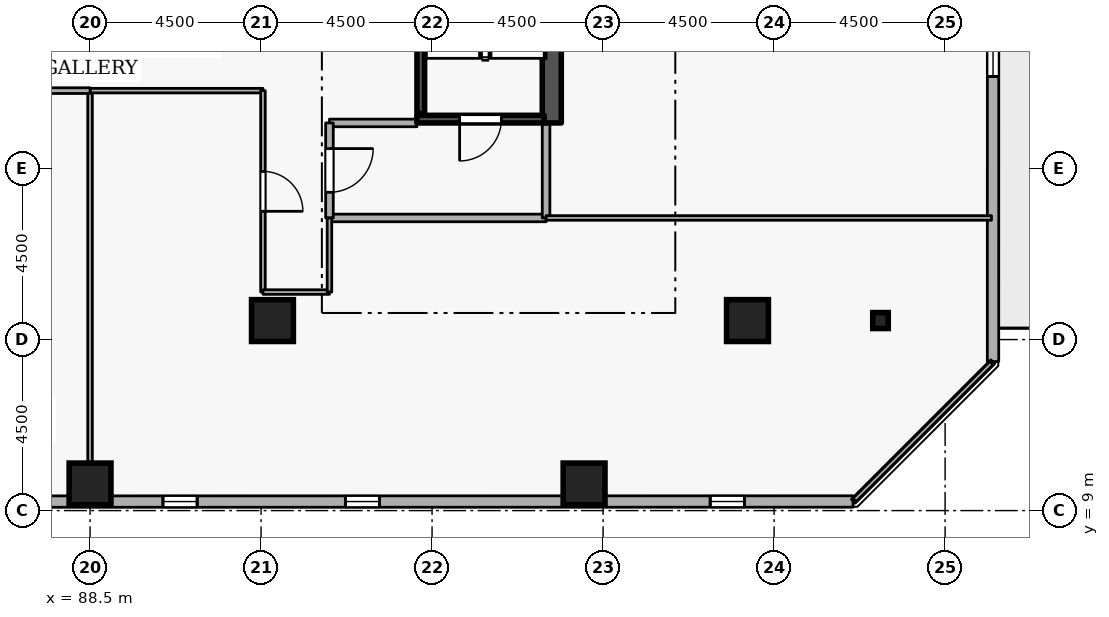
"""IFC4 building model, lengths in metres.
Left out: names, types, materials, properties, quantities, classifications, styles, units other than length and angle.
Written with IfcOpenShell. Run it as: python <this file> out.ifc"""

import sys

from ifc_helpers import new_model, si_unit, direction, frame, frame_2d, origin, origin_2d, place, context, subcontext, project, spatial, rectangle, i_section, extrude, element, fill, save


model = new_model("IFC4")
c1 = context("Model", 3, precision=1e-05, world=origin(), true_north=direction((0.0, 1.0)))
c2 = subcontext(c1, "Body", "Model", "MODEL_VIEW")
j1 = project(units=[si_unit("LENGTHUNIT", "METRE"), si_unit("PLANEANGLEUNIT", "RADIAN")], contexts=[c1])
p1 = place(None, origin())
s1 = spatial("IfcSite", under=j1, at=p1, CompositionType="ELEMENT")
p2 = place(p1, origin())
s2 = spatial("IfcBuilding", under=s1, at=p2, CompositionType="ELEMENT")
p3 = place(p2, frame((0.0, 0.0, 156.3)))
s3 = spatial("IfcBuildingStorey", under=s2, at=p3, CompositionType="ELEMENT", Elevation=156.3)
p4 = place(p3, frame((100.65, 19.2, 0.0), z_axis=(0.0, 0.0, 1.0), x_axis=(0.0, 1.0, 0.0)))
e1 = element("IfcWall", 1, at=p4, inside=s3, PredefinedType="SHEAR", context=c2, shape_type="SweptSolid", body=[
    extrude(rectangle(XDim=15.6, YDim=0.5, at=frame_2d((7.8, 0.0))), origin(), (0.0, 0.0, 1.0), 3.6),
])
for number, where, z_axis, x_axis in (
    (2, (105.8, 14.0, 0.0), (0.0, 0.0, 1.0), (1.0, 0.0, 0.0)),
    (3, (101.5, 9.7, 0.0), (0.0, 0.0, 1.0), (1.0, 0.0, 0.0)),
    (4, (88.5, 9.7, 0.0), (0.0, 0.0, 1.0), (1.0, 0.0, 0.0)),
    (5, (93.3, 14.0, 0.0), (0.0, 0.0, 1.0), (1.0, 0.0, 0.0)),
):
    element("IfcColumn", number, at=place(p3, frame(where, z_axis=z_axis, x_axis=x_axis)), inside=s3, PredefinedType="COLUMN", context=c2, shape_type="SweptSolid", body=[
        extrude(rectangle(XDim=1.1, YDim=1.1, at=origin_2d()), origin(), (0.0, 0.0, 1.0), 3.6),
    ])
p5 = place(p3, frame((109.3, 14.0, 0.0), z_axis=(0.0, 0.0, 1.0), x_axis=(1.0, 0.0, 0.0)))
e6 = element("IfcColumn", 6, at=p5, inside=s3, PredefinedType="COLUMN", context=c2, shape_type="SweptSolid", body=[
    extrude(i_section(OverallWidth=0.407, OverallDepth=0.419, WebThickness=0.031, FlangeThickness=0.049, FilletRadius=0.015, at=origin_2d()), origin(), (0.0, 0.0, 1.0), 3.6),
])
p6 = place(p3, frame((73.319, 9.235, 0.0), z_axis=(0.0, 0.0, 1.0), x_axis=(0.999999994606, 0.000103863011, 0.0)))
e7 = element("IfcWall", 7, at=p6, inside=s3, PredefinedType="STANDARD", context=c2, shape_type="SweptSolid", body=[
    extrude(rectangle(XDim=35.259, YDim=0.3, at=frame_2d((17.629, 0.0))), origin(), (0.0, 0.0, 1.0), 2.7),
])
p7 = place(p6, frame((7.5, 0.0, 0.72)))
e8 = element("IfcOpeningElement", 8, at=p7, cuts=e7, PredefinedType="OPENING", context=c2, shape_type="SweptSolid", body=[
    extrude(rectangle(XDim=0.9, YDim=1.75, at=frame_2d((0.45, 0.875))), frame((0.0, 0.16, 0.0), z_axis=(0.0, -1.0, 0.0), x_axis=(1.0, 0.0, 0.0)), (0.0, 0.0, 1.0), 0.32),
])
p8 = place(p6, frame((12.3, 0.0, 0.72)))
e9 = element("IfcOpeningElement", 9, at=p8, cuts=e7, PredefinedType="OPENING", context=c2, shape_type="SweptSolid", body=[
    extrude(rectangle(XDim=0.9, YDim=1.75, at=frame_2d((0.45, 0.875))), frame((0.0, 0.16, 0.0), z_axis=(0.0, -1.0, 0.0), x_axis=(1.0, 0.0, 0.0)), (0.0, 0.0, 1.0), 0.32),
])
p9 = place(p6, frame((17.1, 0.0, 0.72)))
e10 = element("IfcOpeningElement", 10, at=p9, cuts=e7, PredefinedType="OPENING", context=c2, shape_type="SweptSolid", body=[
    extrude(rectangle(XDim=0.9, YDim=1.75, at=frame_2d((0.45, 0.875))), frame((0.0, 0.16, 0.0), z_axis=(0.0, -1.0, 0.0), x_axis=(1.0, 0.0, 0.0)), (0.0, 0.0, 1.0), 0.32),
])
p10 = place(p6, frame((21.9, 0.0, 0.72)))
e11 = element("IfcOpeningElement", 11, at=p10, cuts=e7, PredefinedType="OPENING", context=c2, shape_type="SweptSolid", body=[
    extrude(rectangle(XDim=0.9, YDim=1.75, at=frame_2d((0.45, 0.875))), frame((0.0, 0.16, 0.0), z_axis=(0.0, -1.0, 0.0), x_axis=(1.0, 0.0, 0.0)), (0.0, 0.0, 1.0), 0.32),
])
p11 = place(p6, frame((31.5, 0.0, 0.72)))
e12 = element("IfcOpeningElement", 12, at=p11, cuts=e7, PredefinedType="OPENING", context=c2, shape_type="SweptSolid", body=[
    extrude(rectangle(XDim=0.9, YDim=1.75, at=frame_2d((0.45, 0.875))), frame((0.0, 0.16, 0.0), z_axis=(0.0, -1.0, 0.0), x_axis=(1.0, 0.0, 0.0)), (0.0, 0.0, 1.0), 0.32),
])
p12 = place(p3, frame((112.261, 12.922, 0.0), z_axis=(0.0, 0.0, 1.0), x_axis=(0.000103863011, 0.999999994606, 0.0)))
e13 = element("IfcWall", 13, at=p12, inside=s3, PredefinedType="STANDARD", context=c2, shape_type="SweptSolid", body=[
    extrude(rectangle(XDim=35.259, YDim=0.3, at=frame_2d((17.629, 0.0))), origin(), (0.0, 0.0, 1.0), 2.7),
])
p13 = place(p12, frame((22.58, 0.0, 0.0)))
e14 = element("IfcOpeningElement", 14, at=p13, cuts=e13, PredefinedType="OPENING", context=c2, shape_type="SweptSolid", body=[
    extrude(rectangle(XDim=1.0, YDim=2.08, at=frame_2d((0.5, 1.04))), frame((0.0, 0.16, 0.0), z_axis=(0.0, -1.0, 0.0), x_axis=(1.0, 0.0, 0.0)), (0.0, 0.0, 1.0), 0.32),
])
p14 = place(p12, frame((7.5, 0.0, 0.72)))
e15 = element("IfcOpeningElement", 15, at=p14, cuts=e13, PredefinedType="OPENING", context=c2, shape_type="SweptSolid", body=[
    extrude(rectangle(XDim=0.9, YDim=1.75, at=frame_2d((0.45, 0.875))), frame((0.0, 0.16, 0.0), z_axis=(0.0, -1.0, 0.0), x_axis=(1.0, 0.0, 0.0)), (0.0, 0.0, 1.0), 0.32),
])
p15 = place(p12, frame((12.3, 0.0, 0.72)))
e16 = element("IfcOpeningElement", 16, at=p15, cuts=e13, PredefinedType="OPENING", context=c2, shape_type="SweptSolid", body=[
    extrude(rectangle(XDim=0.9, YDim=1.75, at=frame_2d((0.45, 0.875))), frame((0.0, 0.16, 0.0), z_axis=(0.0, -1.0, 0.0), x_axis=(1.0, 0.0, 0.0)), (0.0, 0.0, 1.0), 0.32),
])
p16 = place(p12, frame((17.1, 0.0, 0.72)))
e17 = element("IfcOpeningElement", 17, at=p16, cuts=e13, PredefinedType="OPENING", context=c2, shape_type="SweptSolid", body=[
    extrude(rectangle(XDim=0.9, YDim=1.75, at=frame_2d((0.45, 0.875))), frame((0.0, 0.16, 0.0), z_axis=(0.0, -1.0, 0.0), x_axis=(1.0, 0.0, 0.0)), (0.0, 0.0, 1.0), 0.32),
])
p17 = place(p12, frame((26.7, 0.0, 0.72)))
e18 = element("IfcOpeningElement", 18, at=p17, cuts=e13, PredefinedType="OPENING", context=c2, shape_type="SweptSolid", body=[
    extrude(rectangle(XDim=0.9, YDim=1.75, at=frame_2d((0.45, 0.875))), frame((0.0, 0.16, 0.0), z_axis=(0.0, -1.0, 0.0), x_axis=(1.0, 0.0, 0.0)), (0.0, 0.0, 1.0), 0.32),
])
p18 = place(p12, frame((31.5, 0.0, 0.72)))
e19 = element("IfcOpeningElement", 19, at=p18, cuts=e13, PredefinedType="OPENING", context=c2, shape_type="SweptSolid", body=[
    extrude(rectangle(XDim=0.9, YDim=1.75, at=frame_2d((0.45, 0.875))), frame((0.0, 0.16, 0.0), z_axis=(0.0, -1.0, 0.0), x_axis=(1.0, 0.0, 0.0)), (0.0, 0.0, 1.0), 0.32),
])
p19 = place(p3, frame((100.45, 19.3, 0.0), z_axis=(0.0, 0.0, 1.0), x_axis=(-1.0, 0.0, 0.0)))
e20 = element("IfcWall", 20, at=p19, inside=s3, PredefinedType="SHEAR", context=c2, shape_type="SweptSolid", body=[
    extrude(rectangle(XDim=3.35, YDim=0.2, at=frame_2d((1.675, 0.0))), origin(), (0.0, 0.0, 1.0), 3.6),
])
p20 = place(p19, frame((1.125, 0.0, 0.0)))
e21 = element("IfcOpeningElement", 21, at=p20, cuts=e20, PredefinedType="OPENING", context=c2, shape_type="SweptSolid", body=[
    extrude(rectangle(XDim=1.1, YDim=2.1, at=frame_2d((0.55, 1.05))), frame((0.0, 0.11, 0.0), z_axis=(0.0, -1.0, 0.0), x_axis=(1.0, 0.0, 0.0)), (0.0, 0.0, 1.0), 0.22),
])
p21 = place(p3, frame((97.203, 26.55, 0.0), z_axis=(0.0, 0.0, 1.0), x_axis=(0.0, -1.0, 0.0)))
e22 = element("IfcWall", 22, at=p21, inside=s3, PredefinedType="SHEAR", context=c2, shape_type="SweptSolid", body=[
    extrude(rectangle(XDim=7.1, YDim=0.2, at=frame_2d((3.55, 0.0))), origin(), (0.0, 0.0, 1.0), 3.6),
])
p22 = place(p3, frame((94.8, 16.7, 0.0), z_axis=(0.0, 0.0, 1.0), x_axis=(1.0, 0.0, 0.0)))
e23 = element("IfcWall", 23, at=p22, inside=s3, PredefinedType="STANDARD", context=c2, shape_type="SweptSolid", body=[
    extrude(rectangle(XDim=5.7, YDim=0.2, at=frame_2d((2.85, 0.0))), origin(), (0.0, 0.0, 1.0), 3.34),
])
p23 = place(p3, frame((100.5, 16.7, 0.0), z_axis=(0.0, 0.0, 1.0), x_axis=(0.0, 1.0, 0.0)))
e24 = element("IfcWall", 24, at=p23, inside=s3, PredefinedType="STANDARD", context=c2, shape_type="SweptSolid", body=[
    extrude(rectangle(XDim=2.5, YDim=0.2, at=frame_2d((1.25, 0.0))), origin(), (0.0, 0.0, 1.0), 3.34),
])
p24 = place(p3, frame((97.1, 19.2, 0.0), z_axis=(0.0, 0.0, 1.0), x_axis=(-1.0, 0.0, 0.0)))
e25 = element("IfcWall", 25, at=p24, inside=s3, PredefinedType="STANDARD", context=c2, shape_type="SweptSolid", body=[
    extrude(rectangle(XDim=2.3, YDim=0.2, at=frame_2d((1.15, 0.0))), origin(), (0.0, 0.0, 1.0), 2.545),
])
p25 = place(p3, frame((94.8, 19.2, 0.0), z_axis=(0.0, 0.0, 1.0), x_axis=(0.0, -1.0, 0.0)))
e26 = element("IfcWall", 26, at=p25, inside=s3, PredefinedType="STANDARD", context=c2, shape_type="SweptSolid", body=[
    extrude(rectangle(XDim=2.5, YDim=0.2, at=frame_2d((1.25, 0.0))), origin(), (0.0, 0.0, 1.0), 3.34),
])
p26 = place(p25, frame((0.675, 0.0, 0.0)))
e27 = element("IfcOpeningElement", 27, at=p26, cuts=e26, PredefinedType="OPENING", context=c2, shape_type="SweptSolid", body=[
    extrude(rectangle(XDim=1.15, YDim=2.1, at=frame_2d((0.575, 1.05))), frame((0.0, 0.11, 0.0), z_axis=(0.0, -1.0, 0.0), x_axis=(1.0, 0.0, 0.0)), (0.0, 0.0, 1.0), 0.22),
])
p27 = place(p3, frame((88.5, 9.28, 0.0), z_axis=(0.0, 0.0, 1.0), x_axis=(0.0, 1.0, 0.0)))
e28 = element("IfcWall", 28, at=p27, inside=s3, PredefinedType="PARTITIONING", context=c2, shape_type="SweptSolid", body=[
    extrude(rectangle(XDim=10.77, YDim=0.12, at=frame_2d((5.385, 0.0))), origin(), (0.0, 0.0, 1.0), 2.932),
])
p28 = place(p3, frame((88.5, 20.05, 0.0), z_axis=(0.0, 0.0, 1.0), x_axis=(1.0, 0.0, 0.0)))
e29 = element("IfcWall", 29, at=p28, inside=s3, PredefinedType="PARTITIONING", context=c2, shape_type="SweptSolid", body=[
    extrude(rectangle(XDim=4.55, YDim=0.12, at=frame_2d((2.275, 0.0))), origin(), (0.0, 0.0, 1.0), 3.34),
])
p29 = place(p3, frame((93.05, 20.05, 0.0), z_axis=(0.0, 0.0, 1.0), x_axis=(0.0, -1.0, 0.0)))
e30 = element("IfcWall", 30, at=p29, inside=s3, PredefinedType="PARTITIONING", context=c2, shape_type="SweptSolid", body=[
    extrude(rectangle(XDim=5.3, YDim=0.12, at=frame_2d((2.65, 0.0))), origin(), (0.0, 0.0, 1.0), 3.34),
])
p30 = place(p29, frame((2.125, 0.0, 0.0)))
e31 = element("IfcOpeningElement", 31, at=p30, cuts=e30, PredefinedType="OPENING", context=c2, shape_type="SweptSolid", body=[
    extrude(rectangle(XDim=1.05, YDim=2.1, at=frame_2d((0.525, 1.05))), frame((0.0, 0.07, 0.0), z_axis=(0.0, -1.0, 0.0), x_axis=(1.0, 0.0, 0.0)), (0.0, 0.0, 1.0), 0.14),
])
p31 = place(p3, frame((93.05, 14.75, 0.0), z_axis=(0.0, 0.0, 1.0), x_axis=(1.0, 0.0, 0.0)))
e32 = element("IfcWall", 32, at=p31, inside=s3, PredefinedType="PARTITIONING", context=c2, shape_type="SweptSolid", body=[
    extrude(rectangle(XDim=1.75, YDim=0.12, at=frame_2d((0.875, 0.0))), origin(), (0.0, 0.0, 1.0), 3.34),
])
p32 = place(p3, frame((94.8, 14.75, 0.0), z_axis=(0.0, 0.0, 1.0), x_axis=(0.0, 1.0, 0.0)))
e33 = element("IfcWall", 33, at=p32, inside=s3, PredefinedType="PARTITIONING", context=c2, shape_type="SweptSolid", body=[
    extrude(rectangle(XDim=1.95, YDim=0.12, at=frame_2d((0.975, 0.0))), origin(), (0.0, 0.0, 1.0), 3.34),
])
p33 = place(p3, frame((100.5, 16.7, 0.0), z_axis=(0.0, 0.0, 1.0), x_axis=(1.0, 0.0, 0.0)))
e34 = element("IfcWall", 34, at=p33, inside=s3, PredefinedType="PARTITIONING", context=c2, shape_type="SweptSolid", body=[
    extrude(rectangle(XDim=11.72, YDim=0.12, at=frame_2d((5.86, 0.0))), origin(), (0.0, 0.0, 1.0), 3.34),
])
p34 = place(p3, frame((112.22, 12.883, 0.0), z_axis=(0.0, 0.0, 1.0), x_axis=(-0.707106781187, -0.707106781187, 0.0)))
e35 = element("IfcWall", 35, at=p34, inside=s3, PredefinedType="PARTITIONING", context=c2, shape_type="SweptSolid", body=[
    extrude(rectangle(XDim=5.095, YDim=0.12, at=frame_2d((2.547, 0.0))), origin(), (0.0, 0.0, 1.0), 3.34),
])
p35 = place(p3, frame((83.95, 20.05, 0.0), z_axis=(0.0, 0.0, 1.0), x_axis=(1.0, 0.0, 0.0)))
e36 = element("IfcWall", 36, at=p35, inside=s3, PredefinedType="PARTITIONING", context=c2, shape_type="SweptSolid", body=[
    extrude(rectangle(XDim=4.55, YDim=0.15, at=frame_2d((2.275, 0.0))), origin(), (0.0, 0.0, 1.0), 3.34),
])
p36 = place(p9, origin())
e37 = element("IfcWindow", 37, at=p36, inside=s3, PartitioningType="SINGLE_PANEL", PredefinedType="WINDOW", context=c2, shape_type="SweptSolid", body=[
    extrude(rectangle(XDim=0.9, YDim=1.75, at=frame_2d((0.45, 0.875))), frame((0.0, 0.03, 0.0), z_axis=(0.0, -1.0, 0.0), x_axis=(1.0, 0.0, 0.0)), (0.0, 0.0, 1.0), 0.06),
])
fill(e10, e37)
p37 = place(p10, origin())
e38 = element("IfcWindow", 38, at=p37, inside=s3, PartitioningType="SINGLE_PANEL", PredefinedType="WINDOW", context=c2, shape_type="SweptSolid", body=[
    extrude(rectangle(XDim=0.9, YDim=1.75, at=frame_2d((0.45, 0.875))), frame((0.0, 0.03, 0.0), z_axis=(0.0, -1.0, 0.0), x_axis=(1.0, 0.0, 0.0)), (0.0, 0.0, 1.0), 0.06),
])
fill(e11, e38)
p38 = place(p11, origin())
e39 = element("IfcWindow", 39, at=p38, inside=s3, PartitioningType="SINGLE_PANEL", PredefinedType="WINDOW", context=c2, shape_type="SweptSolid", body=[
    extrude(rectangle(XDim=0.9, YDim=1.75, at=frame_2d((0.45, 0.875))), frame((0.0, 0.03, 0.0), z_axis=(0.0, -1.0, 0.0), x_axis=(1.0, 0.0, 0.0)), (0.0, 0.0, 1.0), 0.06),
])
fill(e12, e39)
p39 = place(p14, origin())
e40 = element("IfcWindow", 40, at=p39, inside=s3, PartitioningType="SINGLE_PANEL", PredefinedType="WINDOW", context=c2, shape_type="SweptSolid", body=[
    extrude(rectangle(XDim=0.9, YDim=1.75, at=frame_2d((0.45, 0.875))), frame((0.0, 0.03, 0.0), z_axis=(0.0, -1.0, 0.0), x_axis=(1.0, 0.0, 0.0)), (0.0, 0.0, 1.0), 0.06),
])
fill(e15, e40)
p40 = place(p20, origin())
e41 = element("IfcDoor", 41, at=p40, inside=s3, OperationType="SINGLE_SWING_RIGHT", PredefinedType="DOOR", context=c2, shape_type="SweptSolid", body=[
    extrude(rectangle(XDim=1.1, YDim=2.1, at=frame_2d((0.55, 1.05))), frame((0.0, 0.025, 0.0), z_axis=(0.0, -1.0, 0.0), x_axis=(1.0, 0.0, 0.0)), (0.0, 0.0, 1.0), 0.05),
])
fill(e21, e41)
p41 = place(p26, origin())
e42 = element("IfcDoor", 42, at=p41, inside=s3, OperationType="SINGLE_SWING_LEFT", PredefinedType="DOOR", context=c2, shape_type="SweptSolid", body=[
    extrude(rectangle(XDim=1.15, YDim=2.1, at=frame_2d((0.575, 1.05))), frame((0.0, 0.025, 0.0), z_axis=(0.0, -1.0, 0.0), x_axis=(1.0, 0.0, 0.0)), (0.0, 0.0, 1.0), 0.05),
])
fill(e27, e42)
p42 = place(p30, origin())
e43 = element("IfcDoor", 43, at=p42, inside=s3, OperationType="SINGLE_SWING_RIGHT", PredefinedType="DOOR", context=c2, shape_type="SweptSolid", body=[
    extrude(rectangle(XDim=1.05, YDim=2.1, at=frame_2d((0.525, 1.05))), frame((0.0, 0.025, 0.0), z_axis=(0.0, -1.0, 0.0), x_axis=(1.0, 0.0, 0.0)), (0.0, 0.0, 1.0), 0.05),
])
fill(e31, e43)
save(model, sys.argv[1])
